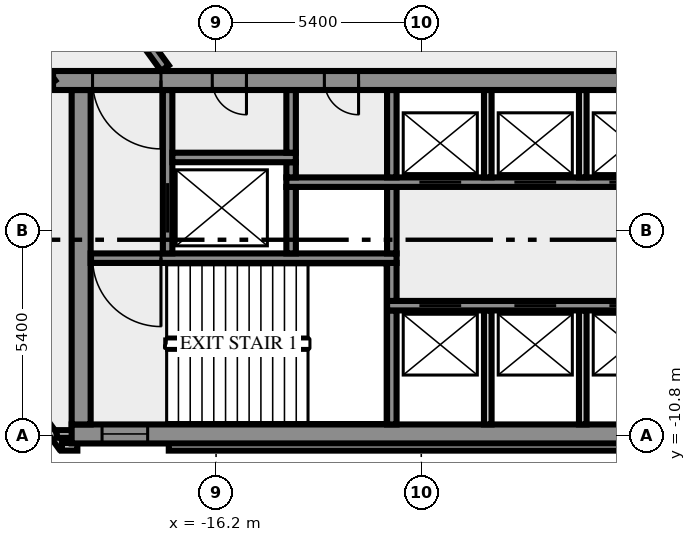
"""IFC4 building model, lengths in metres.
Left out: names, types, materials, properties, quantities, classifications, styles, units other than length and angle.
Written with IfcOpenShell. Run it as: python <this file> out.ifc"""

import sys

from ifc_helpers import new_model, si_unit, direction, frame, frame_2d, origin, place, context, subcontext, project, spatial, rectangle, extrude, element, fill, save


model = new_model("IFC4")
c1 = context("Model", 3, precision=1e-05, world=origin(), true_north=direction((0.0, 1.0)))
c2 = subcontext(c1, "Body", "Model", "MODEL_VIEW")
j1 = project(units=[si_unit("LENGTHUNIT", "METRE"), si_unit("PLANEANGLEUNIT", "RADIAN")], contexts=[c1])
p1 = place(None, origin())
s1 = spatial("IfcSite", under=j1, at=p1, CompositionType="ELEMENT")
p2 = place(p1, origin())
s2 = spatial("IfcBuilding", under=s1, at=p2, CompositionType="ELEMENT")
p3 = place(p2, frame((0.0, 0.0, 125.0)))
s3 = spatial("IfcBuildingStorey", under=s2, at=p3, CompositionType="ELEMENT", Elevation=125.0)
p4 = place(p3, frame((-21.833, -8.909, 0.0), z_axis=(0.0, 0.0, 1.0), x_axis=(0.587766567315, -0.809030569476, 0.0)))
e1 = element("IfcWall", 1, at=p4, inside=s3, PredefinedType="SOLIDWALL", context=c2, shape_type="SweptSolid", body=[
    extrude(rectangle(XDim=2.688, YDim=0.2, at=frame_2d((1.344, 0.0))), origin(), (0.0, 0.0, 1.0), 3.65),
])
p5 = place(p3, frame((-20.256, -11.088, 0.0), z_axis=(0.0, 0.0, 1.0), x_axis=(1.0, 0.0, 0.0)))
e2 = element("IfcWall", 2, at=p5, inside=s3, PredefinedType="SOLIDWALL", context=c2, shape_type="SweptSolid", body=[
    extrude(rectangle(XDim=0.406, YDim=0.2, at=frame_2d((0.203, 0.0))), origin(), (0.0, 0.0, 1.0), 3.65),
])
p6 = place(p3, frame((-17.444, -11.088, 0.0), z_axis=(0.0, 0.0, 1.0), x_axis=(1.0, 0.0, 0.0)))
e3 = element("IfcWall", 3, at=p6, inside=s3, PredefinedType="SOLIDWALL", context=c2, shape_type="SweptSolid", body=[
    extrude(rectangle(XDim=34.888, YDim=0.2, at=frame_2d((17.444, 0.0))), origin(), (0.0, 0.0, 1.0), 3.65),
])
p7 = place(p3, frame((-19.98, -10.75, 0.0), z_axis=(0.0, 0.0, 1.0), x_axis=(-1.0, 0.0, 0.0)))
e4 = element("IfcWall", 4, at=p7, inside=s3, PredefinedType="SOLIDWALL", context=c2, shape_type="SweptSolid", body=[
    extrude(rectangle(XDim=0.417, YDim=0.2, at=frame_2d((0.208, 0.0))), origin(), (0.0, 0.0, 1.0), 3.65),
])
p8 = place(p3, frame((-20.0, -10.75, 0.0), z_axis=(0.0, 0.0, 1.0), x_axis=(1.0, 0.0, 0.0)))
e5 = element("IfcWall", 5, at=p8, inside=s3, PredefinedType="SHEAR", context=c2, shape_type="SweptSolid", body=[
    extrude(rectangle(XDim=40.0, YDim=0.5, at=frame_2d((20.0, 0.0))), origin(), (0.0, 0.0, 1.0), 3.65),
])
p9 = place(p8, frame((0.8, 0.0, 1.0)))
e6 = element("IfcOpeningElement", 6, at=p9, cuts=e5, PredefinedType="OPENING", context=c2, shape_type="SweptSolid", body=[
    extrude(rectangle(XDim=1.2, YDim=1.2, at=frame_2d((0.6, 0.6))), frame((0.0, 0.26, 0.0), z_axis=(0.0, -1.0, 0.0), x_axis=(1.0, 0.0, 0.0)), (0.0, 0.0, 1.0), 0.52),
])
p10 = place(p8, frame((38.0, 0.0, 1.0)))
e7 = element("IfcOpeningElement", 7, at=p10, cuts=e5, PredefinedType="OPENING", context=c2, shape_type="SweptSolid", body=[
    extrude(rectangle(XDim=1.2, YDim=1.2, at=frame_2d((0.6, 0.6))), frame((0.0, 0.26, 0.0), z_axis=(0.0, -1.0, 0.0), x_axis=(1.0, 0.0, 0.0)), (0.0, 0.0, 1.0), 0.52),
])
p11 = place(p3, frame((-19.75, -10.5, 0.0), z_axis=(0.0, 0.0, 1.0), x_axis=(0.0, 1.0, 0.0)))
e8 = element("IfcWall", 8, at=p11, inside=s3, PredefinedType="SHEAR", context=c2, shape_type="SweptSolid", body=[
    extrude(rectangle(XDim=8.8, YDim=0.5, at=frame_2d((4.4, 0.0))), origin(), (0.0, 0.0, 1.0), 3.65),
])
p12 = place(p3, frame((-11.575, -10.5, 0.0), z_axis=(0.0, 0.0, 1.0), x_axis=(0.0, 1.0, 0.0)))
e9 = element("IfcWall", 9, at=p12, inside=s3, PredefinedType="SHEAR", context=c2, shape_type="SweptSolid", body=[
    extrude(rectangle(XDim=3.0, YDim=0.25, at=frame_2d((1.5, 0.0))), origin(), (0.0, 0.0, 1.0), 3.65),
])
for number, where, z_axis, x_axis in (
    (10, (-9.05, -10.5, 0.0), (0.0, 0.0, 1.0), (0.0, 1.0, 0.0)),
    (11, (-6.55, -10.5, 0.0), (0.0, 0.0, 1.0), (0.0, 1.0, 0.0)),
):
    element("IfcWall", number, at=place(p3, frame(where, z_axis=z_axis, x_axis=x_axis)), inside=s3, PredefinedType="SOLIDWALL", context=c2, shape_type="SweptSolid", body=[
        extrude(rectangle(XDim=3.0, YDim=0.2, at=frame_2d((1.5, 0.0))), origin(), (0.0, 0.0, 1.0), 3.65),
    ])
p13 = place(p3, frame((11.7, -7.375, 0.0), z_axis=(0.0, 0.0, 1.0), x_axis=(-1.0, 0.0, 0.0)))
e12 = element("IfcWall", 12, at=p13, inside=s3, PredefinedType="SHEAR", context=c2, shape_type="SweptSolid", body=[
    extrude(rectangle(XDim=23.4, YDim=0.25, at=frame_2d((11.7, 0.0))), origin(), (0.0, 0.0, 1.0), 3.65),
])
p14 = place(p13, frame((21.45, 0.0, 0.0)))
e13 = element("IfcOpeningElement", 13, at=p14, cuts=e12, PredefinedType="OPENING", context=c2, shape_type="SweptSolid", body=[
    extrude(rectangle(XDim=1.1, YDim=2.1, at=frame_2d((0.55, 1.05))), frame((0.0, 0.135, 0.0), z_axis=(0.0, -1.0, 0.0), x_axis=(1.0, 0.0, 0.0)), (0.0, 0.0, 1.0), 0.27),
])
p15 = place(p13, frame((18.95, 0.0, 0.0)))
e14 = element("IfcOpeningElement", 14, at=p15, cuts=e12, PredefinedType="OPENING", context=c2, shape_type="SweptSolid", body=[
    extrude(rectangle(XDim=1.1, YDim=2.1, at=frame_2d((0.55, 1.05))), frame((0.0, 0.135, 0.0), z_axis=(0.0, -1.0, 0.0), x_axis=(1.0, 0.0, 0.0)), (0.0, 0.0, 1.0), 0.27),
])
p16 = place(p13, frame((16.45, 0.0, 0.0)))
e15 = element("IfcOpeningElement", 15, at=p16, cuts=e12, PredefinedType="OPENING", context=c2, shape_type="SweptSolid", body=[
    extrude(rectangle(XDim=1.1, YDim=2.1, at=frame_2d((0.55, 1.05))), frame((0.0, 0.135, 0.0), z_axis=(0.0, -1.0, 0.0), x_axis=(1.0, 0.0, 0.0)), (0.0, 0.0, 1.0), 0.27),
])
p17 = place(p13, frame((14.75, 0.0, 0.0)))
e16 = element("IfcOpeningElement", 16, at=p17, cuts=e12, PredefinedType="OPENING", context=c2, shape_type="SweptSolid", body=[
    extrude(rectangle(XDim=0.7, YDim=2.1, at=frame_2d((0.35, 1.05))), frame((0.0, 0.135, 0.0), z_axis=(0.0, -1.0, 0.0), x_axis=(1.0, 0.0, 0.0)), (0.0, 0.0, 1.0), 0.27),
])
p18 = place(p13, frame((13.35, 0.0, 0.0)))
e17 = element("IfcOpeningElement", 17, at=p18, cuts=e12, PredefinedType="OPENING", context=c2, shape_type="SweptSolid", body=[
    extrude(rectangle(XDim=0.9, YDim=2.1, at=frame_2d((0.45, 1.05))), frame((0.0, 0.135, 0.0), z_axis=(0.0, -1.0, 0.0), x_axis=(1.0, 0.0, 0.0)), (0.0, 0.0, 1.0), 0.27),
])
p19 = place(p13, frame((11.975, 0.0, 0.0)))
e18 = element("IfcOpeningElement", 18, at=p19, cuts=e12, PredefinedType="OPENING", context=c2, shape_type="SweptSolid", body=[
    extrude(rectangle(XDim=0.9, YDim=2.1, at=frame_2d((0.45, 1.05))), frame((0.0, 0.135, 0.0), z_axis=(0.0, -1.0, 0.0), x_axis=(1.0, 0.0, 0.0)), (0.0, 0.0, 1.0), 0.27),
])
p20 = place(p13, frame((10.5, 0.0, 0.0)))
e19 = element("IfcOpeningElement", 19, at=p20, cuts=e12, PredefinedType="OPENING", context=c2, shape_type="SweptSolid", body=[
    extrude(rectangle(XDim=0.9, YDim=2.1, at=frame_2d((0.45, 1.05))), frame((0.0, 0.135, 0.0), z_axis=(0.0, -1.0, 0.0), x_axis=(1.0, 0.0, 0.0)), (0.0, 0.0, 1.0), 0.27),
])
p21 = place(p3, frame((-11.575, -7.25, 0.0), z_axis=(0.0, 0.0, 1.0), x_axis=(0.0, 1.0, 0.0)))
e20 = element("IfcWall", 20, at=p21, inside=s3, PredefinedType="SHEAR", context=c2, shape_type="SweptSolid", body=[
    extrude(rectangle(XDim=1.0, YDim=0.25, at=frame_2d((0.5, 0.0))), origin(), (0.0, 0.0, 1.0), 3.65),
])
p22 = place(p3, frame((-11.45, -6.125, 0.0), z_axis=(0.0, 0.0, 1.0), x_axis=(-1.0, 0.0, 0.0)))
e21 = element("IfcWall", 21, at=p22, inside=s3, PredefinedType="SHEAR", context=c2, shape_type="SweptSolid", body=[
    extrude(rectangle(XDim=8.05, YDim=0.25, at=frame_2d((4.025, 0.0))), origin(), (0.0, 0.0, 1.0), 3.65),
])
p23 = place(p22, frame((6.2, 0.0, 0.0)))
e22 = element("IfcOpeningElement", 22, at=p23, cuts=e21, PredefinedType="OPENING", context=c2, shape_type="SweptSolid", body=[
    extrude(rectangle(XDim=1.8, YDim=2.1, at=frame_2d((0.9, 1.05))), frame((0.0, 0.135, 0.0), z_axis=(0.0, -1.0, 0.0), x_axis=(1.0, 0.0, 0.0)), (0.0, 0.0, 1.0), 0.27),
])
p24 = place(p3, frame((-17.475, -6.0, 0.0), z_axis=(0.0, 0.0, 1.0), x_axis=(0.0, 1.0, 0.0)))
e23 = element("IfcWall", 23, at=p24, inside=s3, PredefinedType="SHEAR", context=c2, shape_type="SweptSolid", body=[
    extrude(rectangle(XDim=4.3, YDim=0.25, at=frame_2d((2.15, 0.0))), origin(), (0.0, 0.0, 1.0), 3.65),
])
p25 = place(p24, frame((0.55, 0.0, 0.0)))
e24 = element("IfcOpeningElement", 24, at=p25, cuts=e23, PredefinedType="OPENING", context=c2, shape_type="SweptSolid", body=[
    extrude(rectangle(XDim=1.3, YDim=2.1, at=frame_2d((0.65, 1.05))), frame((0.0, 0.135, 0.0), z_axis=(0.0, -1.0, 0.0), x_axis=(1.0, 0.0, 0.0)), (0.0, 0.0, 1.0), 0.27),
])
for number, where, z_axis, x_axis in (
    (25, (-14.225, -6.0, 0.0), (0.0, 0.0, 1.0), (0.0, 1.0, 0.0)),
    (26, (-11.575, -6.0, 0.0), (0.0, 0.0, 1.0), (0.0, 1.0, 0.0)),
):
    element("IfcWall", number, at=place(p3, frame(where, z_axis=z_axis, x_axis=x_axis)), inside=s3, PredefinedType="SHEAR", context=c2, shape_type="SweptSolid", body=[
        extrude(rectangle(XDim=1.75, YDim=0.25, at=frame_2d((0.875, 0.0))), origin(), (0.0, 0.0, 1.0), 3.65),
    ])
p26 = place(p3, frame((-14.35, -4.125, 0.0), z_axis=(0.0, 0.0, 1.0), x_axis=(1.0, 0.0, 0.0)))
e27 = element("IfcWall", 27, at=p26, inside=s3, PredefinedType="SHEAR", context=c2, shape_type="SweptSolid", body=[
    extrude(rectangle(XDim=12.7, YDim=0.25, at=frame_2d((6.35, 0.0))), origin(), (0.0, 0.0, 1.0), 3.65),
])
p27 = place(p26, frame((3.5, 0.0, 0.0)))
e28 = element("IfcOpeningElement", 28, at=p27, cuts=e27, PredefinedType="OPENING", context=c2, shape_type="SweptSolid", body=[
    extrude(rectangle(XDim=1.1, YDim=2.1, at=frame_2d((0.55, 1.05))), frame((0.0, 0.135, 0.0), z_axis=(0.0, -1.0, 0.0), x_axis=(1.0, 0.0, 0.0)), (0.0, 0.0, 1.0), 0.27),
])
p28 = place(p26, frame((6.0, 0.0, 0.0)))
e29 = element("IfcOpeningElement", 29, at=p28, cuts=e27, PredefinedType="OPENING", context=c2, shape_type="SweptSolid", body=[
    extrude(rectangle(XDim=1.1, YDim=2.1, at=frame_2d((0.55, 1.05))), frame((0.0, 0.135, 0.0), z_axis=(0.0, -1.0, 0.0), x_axis=(1.0, 0.0, 0.0)), (0.0, 0.0, 1.0), 0.27),
])
p29 = place(p26, frame((8.5, 0.0, 0.0)))
e30 = element("IfcOpeningElement", 30, at=p29, cuts=e27, PredefinedType="OPENING", context=c2, shape_type="SweptSolid", body=[
    extrude(rectangle(XDim=1.1, YDim=2.1, at=frame_2d((0.55, 1.05))), frame((0.0, 0.135, 0.0), z_axis=(0.0, -1.0, 0.0), x_axis=(1.0, 0.0, 0.0)), (0.0, 0.0, 1.0), 0.27),
])
p30 = place(p3, frame((-14.225, -4.0, 0.0), z_axis=(0.0, 0.0, 1.0), x_axis=(0.0, 1.0, 0.0)))
e31 = element("IfcWall", 31, at=p30, inside=s3, PredefinedType="SHEAR", context=c2, shape_type="SweptSolid", body=[
    extrude(rectangle(XDim=0.4, YDim=0.25, at=frame_2d((0.2, 0.0))), origin(), (0.0, 0.0, 1.0), 3.65),
])
p31 = place(p3, frame((-11.575, -4.0, 0.0), z_axis=(0.0, 0.0, 1.0), x_axis=(0.0, 1.0, 0.0)))
e32 = element("IfcWall", 32, at=p31, inside=s3, PredefinedType="SHEAR", context=c2, shape_type="SweptSolid", body=[
    extrude(rectangle(XDim=2.3, YDim=0.25, at=frame_2d((1.15, 0.0))), origin(), (0.0, 0.0, 1.0), 3.65),
])
for number, where, z_axis, x_axis in (
    (33, (-9.05, -4.0, 0.0), (0.0, 0.0, 1.0), (0.0, 1.0, 0.0)),
    (34, (-6.55, -4.0, 0.0), (0.0, 0.0, 1.0), (0.0, 1.0, 0.0)),
):
    element("IfcWall", number, at=place(p3, frame(where, z_axis=z_axis, x_axis=x_axis)), inside=s3, PredefinedType="SOLIDWALL", context=c2, shape_type="SweptSolid", body=[
        extrude(rectangle(XDim=2.3, YDim=0.2, at=frame_2d((1.15, 0.0))), origin(), (0.0, 0.0, 1.0), 3.65),
    ])
p32 = place(p3, frame((-17.35, -3.475, 0.0), z_axis=(0.0, 0.0, 1.0), x_axis=(1.0, 0.0, 0.0)))
e35 = element("IfcWall", 35, at=p32, inside=s3, PredefinedType="SHEAR", context=c2, shape_type="SweptSolid", body=[
    extrude(rectangle(XDim=3.25, YDim=0.25, at=frame_2d((1.625, 0.0))), origin(), (0.0, 0.0, 1.0), 3.65),
])
p33 = place(p3, frame((-14.225, -3.35, 0.0), z_axis=(0.0, 0.0, 1.0), x_axis=(0.0, 1.0, 0.0)))
e36 = element("IfcWall", 36, at=p33, inside=s3, PredefinedType="SHEAR", context=c2, shape_type="SweptSolid", body=[
    extrude(rectangle(XDim=1.65, YDim=0.25, at=frame_2d((0.825, 0.0))), origin(), (0.0, 0.0, 1.0), 3.65),
])
p34 = place(p3, frame((20.49, -1.45, 0.0), z_axis=(0.0, 0.0, 1.0), x_axis=(-1.0, 0.0, 0.0)))
e37 = element("IfcWall", 37, at=p34, inside=s3, PredefinedType="SHEAR", context=c2, shape_type="SweptSolid", body=[
    extrude(rectangle(XDim=40.98, YDim=0.5, at=frame_2d((20.49, 0.0))), origin(), (0.0, 0.0, 1.0), 3.65),
])
p35 = place(p34, frame((38.14, 0.0, 0.0)))
e38 = element("IfcOpeningElement", 38, at=p35, cuts=e37, PredefinedType="OPENING", context=c2, shape_type="SweptSolid", body=[
    extrude(rectangle(XDim=1.8, YDim=2.1, at=frame_2d((0.9, 1.05))), frame((0.0, 0.26, 0.0), z_axis=(0.0, -1.0, 0.0), x_axis=(1.0, 0.0, 0.0)), (0.0, 0.0, 1.0), 0.52),
])
p36 = place(p34, frame((35.89, 0.0, 0.0)))
e39 = element("IfcOpeningElement", 39, at=p36, cuts=e37, PredefinedType="OPENING", context=c2, shape_type="SweptSolid", body=[
    extrude(rectangle(XDim=0.9, YDim=2.1, at=frame_2d((0.45, 1.05))), frame((0.0, 0.26, 0.0), z_axis=(0.0, -1.0, 0.0), x_axis=(1.0, 0.0, 0.0)), (0.0, 0.0, 1.0), 0.52),
])
p37 = place(p34, frame((32.94, 0.0, 0.0)))
e40 = element("IfcOpeningElement", 40, at=p37, cuts=e37, PredefinedType="OPENING", context=c2, shape_type="SweptSolid", body=[
    extrude(rectangle(XDim=0.9, YDim=2.1, at=frame_2d((0.45, 1.05))), frame((0.0, 0.26, 0.0), z_axis=(0.0, -1.0, 0.0), x_axis=(1.0, 0.0, 0.0)), (0.0, 0.0, 1.0), 0.52),
])
p38 = place(p34, frame((19.59, 0.0, 0.0)))
e41 = element("IfcOpeningElement", 41, at=p38, cuts=e37, PredefinedType="OPENING", context=c2, shape_type="SweptSolid", body=[
    extrude(rectangle(XDim=2.0, YDim=2.1, at=frame_2d((1.0, 1.05))), frame((0.0, 0.26, 0.0), z_axis=(0.0, -1.0, 0.0), x_axis=(1.0, 0.0, 0.0)), (0.0, 0.0, 1.0), 0.52),
])
p39 = place(p34, frame((7.14, 0.0, 0.0)))
e42 = element("IfcOpeningElement", 42, at=p39, cuts=e37, PredefinedType="OPENING", context=c2, shape_type="SweptSolid", body=[
    extrude(rectangle(XDim=0.9, YDim=2.1, at=frame_2d((0.45, 1.05))), frame((0.0, 0.26, 0.0), z_axis=(0.0, -1.0, 0.0), x_axis=(1.0, 0.0, 0.0)), (0.0, 0.0, 1.0), 0.52),
])
p40 = place(p34, frame((5.028, 0.0, 0.0)))
e43 = element("IfcOpeningElement", 43, at=p40, cuts=e37, PredefinedType="OPENING", context=c2, shape_type="SweptSolid", body=[
    extrude(rectangle(XDim=0.8, YDim=2.1, at=frame_2d((0.4, 1.05))), frame((0.0, 0.26, 0.0), z_axis=(0.0, -1.0, 0.0), x_axis=(1.0, 0.0, 0.0)), (0.0, 0.0, 1.0), 0.52),
])
p41 = place(p34, frame((3.452, 0.0, 0.0)))
e44 = element("IfcOpeningElement", 44, at=p41, cuts=e37, PredefinedType="OPENING", context=c2, shape_type="SweptSolid", body=[
    extrude(rectangle(XDim=0.8, YDim=2.1, at=frame_2d((0.4, 1.05))), frame((0.0, 0.26, 0.0), z_axis=(0.0, -1.0, 0.0), x_axis=(1.0, 0.0, 0.0)), (0.0, 0.0, 1.0), 0.52),
])
p42 = place(p34, frame((1.04, 0.0, 0.0)))
e45 = element("IfcOpeningElement", 45, at=p42, cuts=e37, PredefinedType="OPENING", context=c2, shape_type="SweptSolid", body=[
    extrude(rectangle(XDim=1.8, YDim=2.1, at=frame_2d((0.9, 1.05))), frame((0.0, 0.26, 0.0), z_axis=(0.0, -1.0, 0.0), x_axis=(1.0, 0.0, 0.0)), (0.0, 0.0, 1.0), 0.52),
])
p43 = place(p3, frame((-20.531, -1.523, 0.0), z_axis=(0.0, 0.0, 1.0), x_axis=(-0.587784522481, 0.809017524614, 0.0)))
e46 = element("IfcWall", 46, at=p43, inside=s3, PredefinedType="SOLIDWALL", context=c2, shape_type="SweptSolid", body=[
    extrude(rectangle(XDim=49.912, YDim=0.25, at=frame_2d((24.956, 0.0))), origin(), (0.0, 0.0, 1.0), 3.65),
])
p44 = place(p43, frame((34.816, 0.0, 0.0)))
e47 = element("IfcOpeningElement", 47, at=p44, cuts=e46, PredefinedType="OPENING", context=c2, shape_type="SweptSolid", body=[
    extrude(rectangle(XDim=0.9, YDim=2.1, at=frame_2d((0.45, 1.05))), frame((0.0, 0.135, 0.0), z_axis=(0.0, -1.0, 0.0), x_axis=(1.0, 0.0, 0.0)), (0.0, 0.0, 1.0), 0.27),
])
p45 = place(p43, frame((33.215, 0.0, 0.0)))
e48 = element("IfcOpeningElement", 48, at=p45, cuts=e46, PredefinedType="OPENING", context=c2, shape_type="SweptSolid", body=[
    extrude(rectangle(XDim=0.9, YDim=2.1, at=frame_2d((0.45, 1.05))), frame((0.0, 0.135, 0.0), z_axis=(0.0, -1.0, 0.0), x_axis=(1.0, 0.0, 0.0)), (0.0, 0.0, 1.0), 0.27),
])
p46 = place(p43, frame((22.916, 0.0, 0.0)))
e49 = element("IfcOpeningElement", 49, at=p46, cuts=e46, PredefinedType="OPENING", context=c2, shape_type="SweptSolid", body=[
    extrude(rectangle(XDim=1.8, YDim=2.1, at=frame_2d((0.9, 1.05))), frame((0.0, 0.135, 0.0), z_axis=(0.0, -1.0, 0.0), x_axis=(1.0, 0.0, 0.0)), (0.0, 0.0, 1.0), 0.27),
])
p47 = place(p43, frame((0.483, 0.0, 0.0)))
e50 = element("IfcOpeningElement", 50, at=p47, cuts=e46, PredefinedType="OPENING", context=c2, shape_type="SweptSolid", body=[
    extrude(rectangle(XDim=1.8, YDim=2.1, at=frame_2d((0.9, 1.05))), frame((0.0, 0.135, 0.0), z_axis=(0.0, -1.0, 0.0), x_axis=(1.0, 0.0, 0.0)), (0.0, 0.0, 1.0), 0.27),
])
p48 = place(p43, frame((25.365, 0.0, 0.0)))
e51 = element("IfcOpeningElement", 51, at=p48, cuts=e46, PredefinedType="OPENING", context=c2, shape_type="SweptSolid", body=[
    extrude(rectangle(XDim=0.9, YDim=2.1, at=frame_2d((0.45, 1.05))), frame((0.0, 0.135, 0.0), z_axis=(0.0, -1.0, 0.0), x_axis=(1.0, 0.0, 0.0)), (0.0, 0.0, 1.0), 0.27),
])
p49 = place(p3, frame((-37.232, 25.972, 0.0), z_axis=(0.0, 0.0, 1.0), x_axis=(0.587786323093, -0.809016216391, 0.0)))
e52 = element("IfcWall", 52, at=p49, inside=s3, PredefinedType="SOLIDWALL", context=c2, shape_type="SweptSolid", body=[
    extrude(rectangle(XDim=33.493, YDim=0.25, at=frame_2d((16.747, 0.0))), origin(), (0.0, 0.0, 1.0), 3.65),
])
p50 = place(p49, frame((9.785, 0.0, 0.0)))
e53 = element("IfcOpeningElement", 53, at=p50, cuts=e52, PredefinedType="OPENING", context=c2, shape_type="SweptSolid", body=[
    extrude(rectangle(XDim=1.8, YDim=2.1, at=frame_2d((0.9, 1.05))), frame((0.0, 0.135, 0.0), z_axis=(0.0, -1.0, 0.0), x_axis=(1.0, 0.0, 0.0)), (0.0, 0.0, 1.0), 0.27),
])
p51 = place(p49, frame((29.152, 0.0, 0.0)))
e54 = element("IfcOpeningElement", 54, at=p51, cuts=e52, PredefinedType="OPENING", context=c2, shape_type="SweptSolid", body=[
    extrude(rectangle(XDim=0.9, YDim=2.1, at=frame_2d((0.45, 1.05))), frame((0.0, 0.135, 0.0), z_axis=(0.0, -1.0, 0.0), x_axis=(1.0, 0.0, 0.0)), (0.0, 0.0, 1.0), 0.27),
])
p52 = place(p49, frame((1.335, 0.0, 0.0)))
e55 = element("IfcOpeningElement", 55, at=p52, cuts=e52, PredefinedType="OPENING", context=c2, shape_type="SweptSolid", body=[
    extrude(rectangle(XDim=0.9, YDim=2.1, at=frame_2d((0.45, 1.05))), frame((0.0, 0.135, 0.0), z_axis=(0.0, -1.0, 0.0), x_axis=(1.0, 0.0, 0.0)), (0.0, 0.0, 1.0), 0.27),
])
p53 = place(p9, origin())
e56 = element("IfcWindow", 56, at=p53, inside=s3, PartitioningType="SINGLE_PANEL", PredefinedType="WINDOW", context=c2, shape_type="SweptSolid", body=[
    extrude(rectangle(XDim=1.2, YDim=1.2, at=frame_2d((0.6, 0.6))), frame((0.0, 0.03, 0.0), z_axis=(0.0, -1.0, 0.0), x_axis=(1.0, 0.0, 0.0)), (0.0, 0.0, 1.0), 0.06),
])
fill(e6, e56)
p54 = place(p14, origin())
e57 = element("IfcDoor", 57, at=p54, inside=s3, OperationType="DOUBLE_DOOR_SLIDING", PredefinedType="DOOR", context=c2, shape_type="SweptSolid", body=[
    extrude(rectangle(XDim=1.1, YDim=2.1, at=frame_2d((0.55, 1.05))), frame((0.0, 0.025, 0.0), z_axis=(0.0, -1.0, 0.0), x_axis=(1.0, 0.0, 0.0)), (0.0, 0.0, 1.0), 0.05),
])
fill(e13, e57)
p55 = place(p15, origin())
e58 = element("IfcDoor", 58, at=p55, inside=s3, OperationType="DOUBLE_DOOR_SLIDING", PredefinedType="DOOR", context=c2, shape_type="SweptSolid", body=[
    extrude(rectangle(XDim=1.1, YDim=2.1, at=frame_2d((0.55, 1.05))), frame((0.0, 0.025, 0.0), z_axis=(0.0, -1.0, 0.0), x_axis=(1.0, 0.0, 0.0)), (0.0, 0.0, 1.0), 0.05),
])
fill(e14, e58)
p56 = place(p16, origin())
e59 = element("IfcDoor", 59, at=p56, inside=s3, OperationType="DOUBLE_DOOR_SLIDING", PredefinedType="DOOR", context=c2, shape_type="SweptSolid", body=[
    extrude(rectangle(XDim=1.1, YDim=2.1, at=frame_2d((0.55, 1.05))), frame((0.0, 0.025, 0.0), z_axis=(0.0, -1.0, 0.0), x_axis=(1.0, 0.0, 0.0)), (0.0, 0.0, 1.0), 0.05),
])
fill(e15, e59)
p57 = place(p23, origin())
e60 = element("IfcDoor", 60, at=p57, inside=s3, OperationType="DOUBLE_DOOR_SINGLE_SWING", PredefinedType="DOOR", context=c2, shape_type="SweptSolid", body=[
    extrude(rectangle(XDim=1.8, YDim=2.1, at=frame_2d((0.9, 1.05))), frame((0.0, 0.025, 0.0), z_axis=(0.0, -1.0, 0.0), x_axis=(1.0, 0.0, 0.0)), (0.0, 0.0, 1.0), 0.05),
])
fill(e22, e60)
p58 = place(p25, origin())
e61 = element("IfcDoor", 61, at=p58, inside=s3, OperationType="DOUBLE_DOOR_SLIDING", PredefinedType="DOOR", context=c2, shape_type="SweptSolid", body=[
    extrude(rectangle(XDim=1.3, YDim=2.1, at=frame_2d((0.65, 1.05))), frame((0.0, 0.025, 0.0), z_axis=(0.0, -1.0, 0.0), x_axis=(1.0, 0.0, 0.0)), (0.0, 0.0, 1.0), 0.05),
])
fill(e24, e61)
p59 = place(p27, origin())
e62 = element("IfcDoor", 62, at=p59, inside=s3, OperationType="DOUBLE_DOOR_SLIDING", PredefinedType="DOOR", context=c2, shape_type="SweptSolid", body=[
    extrude(rectangle(XDim=1.1, YDim=2.1, at=frame_2d((0.55, 1.05))), frame((0.0, 0.025, 0.0), z_axis=(0.0, -1.0, 0.0), x_axis=(1.0, 0.0, 0.0)), (0.0, 0.0, 1.0), 0.05),
])
fill(e28, e62)
p60 = place(p28, origin())
e63 = element("IfcDoor", 63, at=p60, inside=s3, OperationType="DOUBLE_DOOR_SLIDING", PredefinedType="DOOR", context=c2, shape_type="SweptSolid", body=[
    extrude(rectangle(XDim=1.1, YDim=2.1, at=frame_2d((0.55, 1.05))), frame((0.0, 0.025, 0.0), z_axis=(0.0, -1.0, 0.0), x_axis=(1.0, 0.0, 0.0)), (0.0, 0.0, 1.0), 0.05),
])
fill(e29, e63)
p61 = place(p29, origin())
e64 = element("IfcDoor", 64, at=p61, inside=s3, OperationType="DOUBLE_DOOR_SLIDING", PredefinedType="DOOR", context=c2, shape_type="SweptSolid", body=[
    extrude(rectangle(XDim=1.1, YDim=2.1, at=frame_2d((0.55, 1.05))), frame((0.0, 0.025, 0.0), z_axis=(0.0, -1.0, 0.0), x_axis=(1.0, 0.0, 0.0)), (0.0, 0.0, 1.0), 0.05),
])
fill(e30, e64)
p62 = place(p35, origin())
e65 = element("IfcDoor", 65, at=p62, inside=s3, OperationType="DOUBLE_DOOR_SINGLE_SWING", PredefinedType="DOOR", context=c2, shape_type="SweptSolid", body=[
    extrude(rectangle(XDim=1.8, YDim=2.1, at=frame_2d((0.9, 1.05))), frame((0.0, 0.025, 0.0), z_axis=(0.0, -1.0, 0.0), x_axis=(1.0, 0.0, 0.0)), (0.0, 0.0, 1.0), 0.05),
])
fill(e38, e65)
p63 = place(p36, origin())
e66 = element("IfcDoor", 66, at=p63, inside=s3, OperationType="SINGLE_SWING_RIGHT", PredefinedType="DOOR", context=c2, shape_type="SweptSolid", body=[
    extrude(rectangle(XDim=0.9, YDim=2.1, at=frame_2d((0.45, 1.05))), frame((0.0, 0.025, 0.0), z_axis=(0.0, -1.0, 0.0), x_axis=(1.0, 0.0, 0.0)), (0.0, 0.0, 1.0), 0.05),
])
fill(e39, e66)
p64 = place(p37, origin())
e67 = element("IfcDoor", 67, at=p64, inside=s3, OperationType="SINGLE_SWING_RIGHT", PredefinedType="DOOR", context=c2, shape_type="SweptSolid", body=[
    extrude(rectangle(XDim=0.9, YDim=2.1, at=frame_2d((0.45, 1.05))), frame((0.0, 0.025, 0.0), z_axis=(0.0, -1.0, 0.0), x_axis=(1.0, 0.0, 0.0)), (0.0, 0.0, 1.0), 0.05),
])
fill(e40, e67)
save(model, sys.argv[1])
